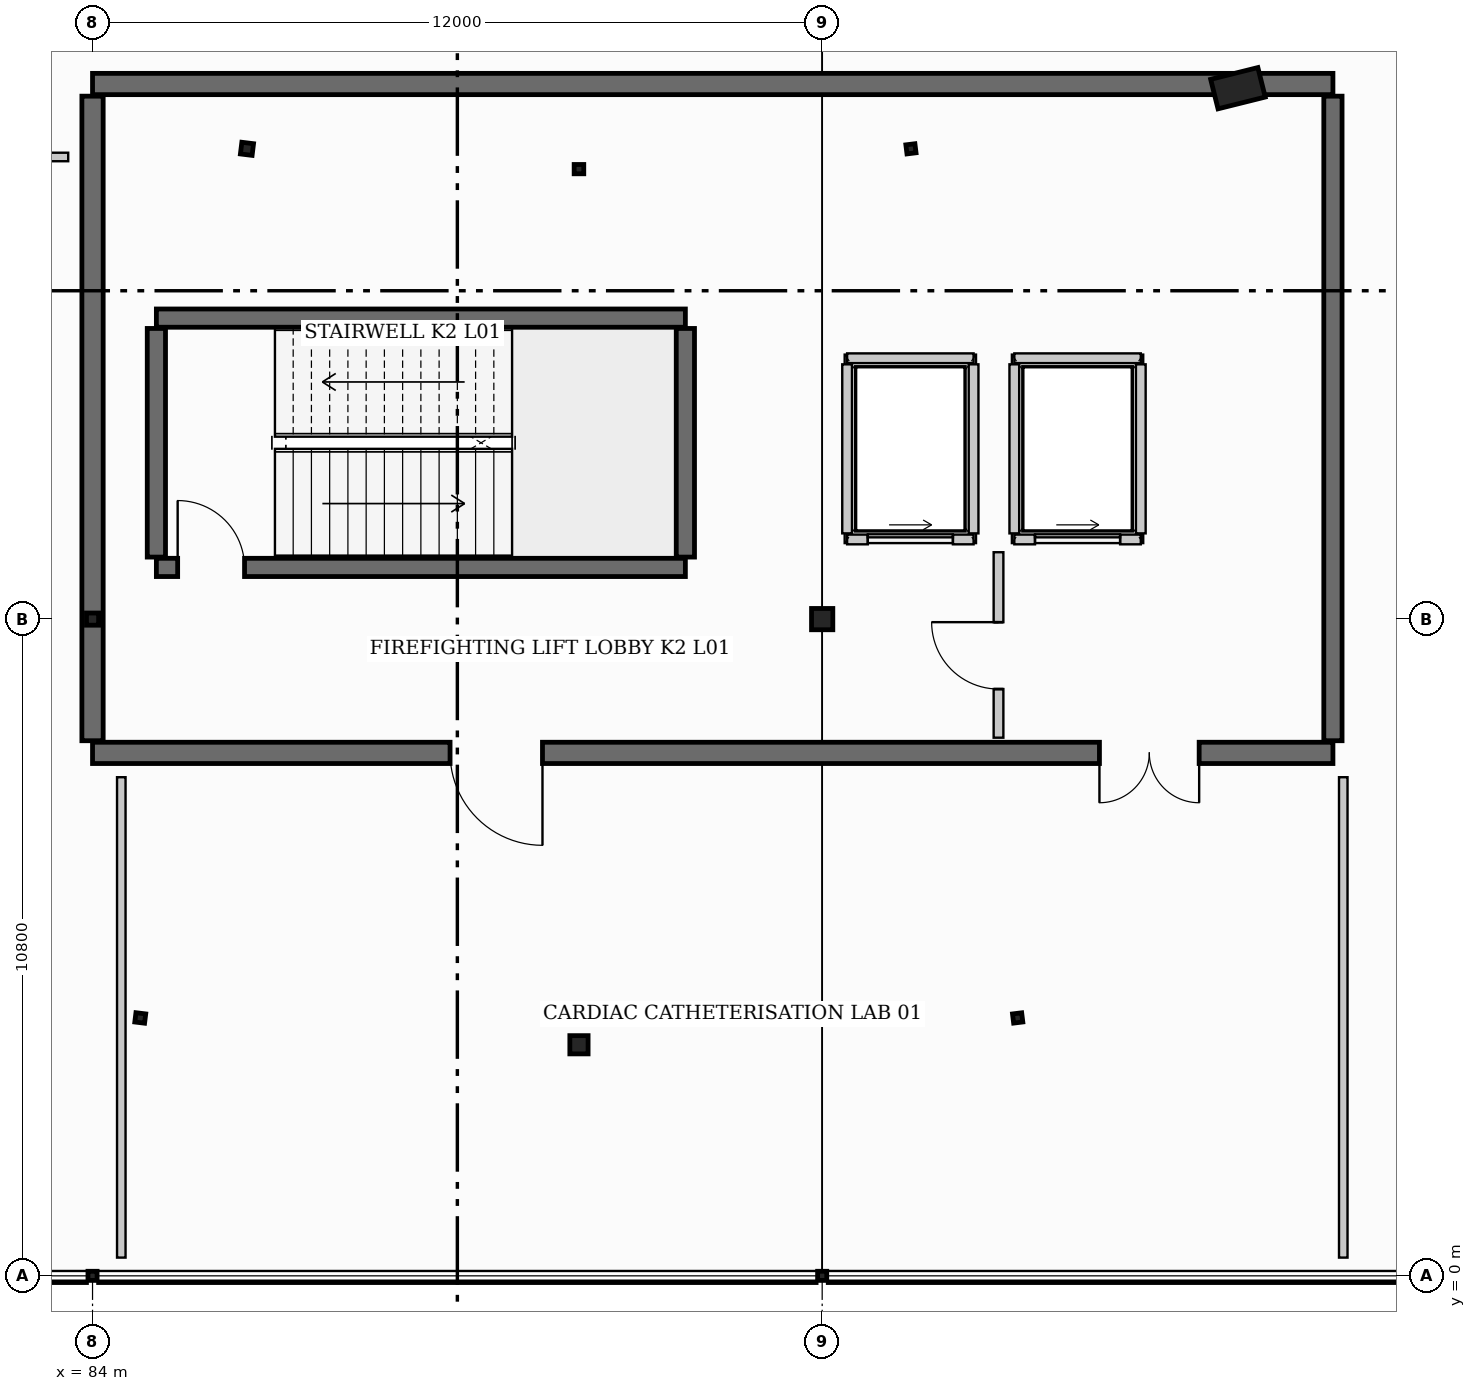
"""IFC4 building model, lengths in metres.
Left out: names, types, materials, properties, quantities, classifications, styles, units other than length and angle.
Written with IfcOpenShell. Run it as: python <this file> out.ifc"""

import sys

from ifc_helpers import new_model, si_unit, direction, frame, frame_2d, origin, origin_2d, place, context, subcontext, project, spatial, rectangle, hollow_rectangle, hollow_circle, i_section, extrude, element, fill, save


model = new_model("IFC4")
c1 = context("Model", 3, precision=1e-05, world=origin(), true_north=direction((0.0, 1.0)))
c2 = subcontext(c1, "Body", "Model", "MODEL_VIEW")
j1 = project(units=[si_unit("LENGTHUNIT", "METRE"), si_unit("PLANEANGLEUNIT", "RADIAN")], contexts=[c1])
p1 = place(None, origin())
s1 = spatial("IfcSite", under=j1, at=p1, CompositionType="ELEMENT")
p2 = place(p1, origin())
s2 = spatial("IfcBuilding", under=s1, at=p2, CompositionType="ELEMENT")
p3 = place(p2, frame((0.0, 0.0, 4.8)))
s3 = spatial("IfcBuildingStorey", under=s2, at=p3, CompositionType="ELEMENT", Elevation=4.8)
p4 = place(p3, frame((84.0, 0.0, 0.0), z_axis=(0.0, 0.0, 1.0), x_axis=(0.0, 1.0, 0.0)))
e1 = element("IfcColumn", 1, at=p4, inside=s3, PredefinedType="COLUMN", context=c2, shape_type="SweptSolid", body=[
    extrude(hollow_rectangle(XDim=0.15, YDim=0.15, WallThickness=0.008, at=origin_2d()), origin(), (0.0, 0.0, 1.0), 4.8),
])
p5 = place(p3, frame((84.0, 10.8, 0.0), z_axis=(0.0, 0.0, 1.0), x_axis=(0.0, 1.0, 0.0)))
e2 = element("IfcColumn", 2, at=p5, inside=s3, PredefinedType="COLUMN", context=c2, shape_type="SweptSolid", body=[
    extrude(hollow_rectangle(XDim=0.2, YDim=0.2, WallThickness=0.01, at=origin_2d()), origin(), (0.0, 0.0, 1.0), 4.8),
])
p6 = place(p3, frame((96.0, 0.0, 0.0), z_axis=(0.0, 0.0, 1.0), x_axis=(1.0, 0.0, 0.0)))
e3 = element("IfcColumn", 3, at=p6, inside=s3, PredefinedType="COLUMN", context=c2, shape_type="SweptSolid", body=[
    extrude(hollow_rectangle(XDim=0.15, YDim=0.15, WallThickness=0.008, at=origin_2d()), origin(), (0.0, 0.0, 1.0), 4.8),
])
p7 = place(p3, frame((96.0, 10.8, 0.0), z_axis=(0.0, 0.0, 1.0), x_axis=(1.0, 0.0, 0.0)))
e4 = element("IfcColumn", 4, at=p7, inside=s3, PredefinedType="COLUMN", context=c2, shape_type="SweptSolid", body=[
    extrude(i_section(OverallWidth=0.35, OverallDepth=0.35, WebThickness=0.014, FlangeThickness=0.024, at=origin_2d()), origin(), (0.0, 0.0, 1.0), 4.8),
])
p8 = place(p3, frame((84.785, 4.241, 0.0), z_axis=(0.0, 0.0, 1.0), x_axis=(0.121869343405, 0.992546151641, 0.0)))
e5 = element("IfcColumn", 5, at=p8, inside=s3, PredefinedType="COLUMN", context=c2, shape_type="SweptSolid", body=[
    extrude(i_section(OverallWidth=0.154, OverallDepth=0.162, WebThickness=0.008, FlangeThickness=0.011, at=origin_2d()), origin(), (0.0, 0.0, 1.0), 4.8),
])
p9 = place(p3, frame((86.54, 18.534, 0.0), z_axis=(0.0, 0.0, 1.0), x_axis=(0.121869343405, 0.992546151641, 0.0)))
e6 = element("IfcColumn", 6, at=p9, inside=s3, PredefinedType="COLUMN", context=c2, shape_type="SweptSolid", body=[
    extrude(hollow_circle(Radius=0.097, WallThickness=0.008, at=origin_2d()), origin(), (0.0, 0.0, 1.0), 4.8),
])
p10 = place(p3, frame((92.0, 3.8, 0.0), z_axis=(0.0, 0.0, 1.0), x_axis=(0.0, 1.0, 0.0)))
e7 = element("IfcColumn", 7, at=p10, inside=s3, PredefinedType="COLUMN", context=c2, shape_type="SweptSolid", body=[
    extrude(hollow_rectangle(XDim=0.3, YDim=0.3, WallThickness=0.012, at=origin_2d()), origin(), (0.0, 0.0, 1.0), 4.8),
])
p11 = place(p3, frame((92.0, 18.2, 0.0), z_axis=(0.0, 0.0, 1.0), x_axis=(0.0, 1.0, 0.0)))
e8 = element("IfcColumn", 8, at=p11, inside=s3, PredefinedType="COLUMN", context=c2, shape_type="SweptSolid", body=[
    extrude(i_section(OverallWidth=0.153, OverallDepth=0.158, WebThickness=0.007, FlangeThickness=0.01, at=origin_2d()), origin(), (0.0, 0.0, 1.0), 4.8),
])
p12 = place(p3, frame((99.215, 4.241, 0.0), z_axis=(0.0, 0.0, 1.0), x_axis=(-0.121869343405, 0.992546151641, 0.0)))
e9 = element("IfcColumn", 9, at=p12, inside=s3, PredefinedType="COLUMN", context=c2, shape_type="SweptSolid", body=[
    extrude(i_section(OverallWidth=0.152, OverallDepth=0.152, WebThickness=0.006, FlangeThickness=0.007, at=origin_2d()), origin(), (0.0, 0.0, 1.0), 4.8),
])
p13 = place(p3, frame((97.46, 18.534, 0.0), z_axis=(0.0, 0.0, 1.0), x_axis=(-0.121869343405, 0.992546151641, 0.0)))
e10 = element("IfcColumn", 10, at=p13, inside=s3, PredefinedType="COLUMN", context=c2, shape_type="SweptSolid", body=[
    extrude(hollow_rectangle(XDim=0.15, YDim=0.15, WallThickness=0.008, at=origin_2d()), origin(), (0.0, 0.0, 1.0), 4.8),
])
p14 = place(p3, frame((102.838, 19.531, 0.0), z_axis=(0.0, 0.0, 1.0), x_axis=(-0.2419218956, 0.970295726276, 0.0)))
e11 = element("IfcColumn", 11, at=p14, inside=s3, PredefinedType="PILASTER", context=c2, shape_type="SweptSolid", body=[
    extrude(rectangle(XDim=0.5, YDim=0.8, at=origin_2d()), origin(), (0.0, 0.0, 1.0), 4.8),
])
p15 = place(p3, frame((84.0, 19.6, 0.0), z_axis=(0.0, 0.0, 1.0), x_axis=(1.0, 0.0, 0.0)))
e12 = element("IfcWall", 12, at=p15, inside=s3, PredefinedType="SHEAR", context=c2, shape_type="SweptSolid", body=[
    extrude(rectangle(XDim=20.4, YDim=0.35, at=frame_2d((10.2, 0.0))), origin(), (0.0, 0.0, 1.0), 4.8),
])
p16 = place(p3, frame((104.4, 8.6, 0.0), z_axis=(0.0, 0.0, 1.0), x_axis=(-1.0, 0.0, 0.0)))
e13 = element("IfcWall", 13, at=p16, inside=s3, PredefinedType="SHEAR", context=c2, shape_type="SweptSolid", body=[
    extrude(rectangle(XDim=20.4, YDim=0.35, at=frame_2d((10.2, 0.0))), origin(), (0.0, 0.0, 1.0), 4.8),
])
p17 = place(p16, frame((2.2, 0.0, 0.0)))
e14 = element("IfcOpeningElement", 14, at=p17, cuts=e13, PredefinedType="OPENING", context=c2, shape_type="SweptSolid", body=[
    extrude(rectangle(XDim=1.64, YDim=2.2, at=frame_2d((0.82, 1.1))), frame((0.0, 0.185, 0.0), z_axis=(0.0, -1.0, 0.0), x_axis=(1.0, 0.0, 0.0)), (0.0, 0.0, 1.0), 0.37),
])
p18 = place(p16, frame((13.0, 0.0, 0.0)))
e15 = element("IfcOpeningElement", 15, at=p18, cuts=e13, PredefinedType="OPENING", context=c2, shape_type="SweptSolid", body=[
    extrude(rectangle(XDim=1.52, YDim=2.16, at=frame_2d((0.76, 1.08))), frame((0.0, 0.185, 0.0), z_axis=(0.0, -1.0, 0.0), x_axis=(1.0, 0.0, 0.0)), (0.0, 0.0, 1.0), 0.37),
])
p19 = place(p3, frame((84.0, 8.8, 0.0), z_axis=(0.0, 0.0, 1.0), x_axis=(0.0, 1.0, 0.0)))
e16 = element("IfcWall", 16, at=p19, inside=s3, PredefinedType="SHEAR", context=c2, shape_type="SweptSolid", body=[
    extrude(rectangle(XDim=10.6, YDim=0.35, at=frame_2d((5.3, 0.0))), origin(), (0.0, 0.0, 1.0), 4.8),
])
p20 = place(p3, frame((104.4, 19.4, 0.0), z_axis=(0.0, 0.0, 1.0), x_axis=(0.0, -1.0, 0.0)))
e17 = element("IfcWall", 17, at=p20, inside=s3, PredefinedType="SHEAR", context=c2, shape_type="SweptSolid", body=[
    extrude(rectangle(XDim=10.6, YDim=0.3, at=frame_2d((5.3, 0.0))), origin(), (0.0, 0.0, 1.0), 4.8),
])
p21 = place(p3, frame((85.05, 11.65, 0.0), z_axis=(0.0, 0.0, 1.0), x_axis=(1.0, 0.0, 0.0)))
e18 = element("IfcWall", 18, at=p21, inside=s3, PredefinedType="SHEAR", context=c2, shape_type="SweptSolid", body=[
    extrude(rectangle(XDim=8.7, YDim=0.3, at=frame_2d((4.35, 0.0))), origin(), (0.0, 0.0, 1.0), 4.8),
])
p22 = place(p21, frame((0.35, 0.0, 0.0)))
e19 = element("IfcOpeningElement", 19, at=p22, cuts=e18, PredefinedType="OPENING", context=c2, shape_type="SweptSolid", body=[
    extrude(rectangle(XDim=1.1, YDim=2.15, at=frame_2d((0.55, 1.075))), frame((0.0, 0.16, 0.0), z_axis=(0.0, -1.0, 0.0), x_axis=(1.0, 0.0, 0.0)), (0.0, 0.0, 1.0), 0.32),
])
p23 = place(p3, frame((93.75, 15.75, 0.0), z_axis=(0.0, 0.0, 1.0), x_axis=(-1.0, 0.0, 0.0)))
e20 = element("IfcWall", 20, at=p23, inside=s3, PredefinedType="SHEAR", context=c2, shape_type="SweptSolid", body=[
    extrude(rectangle(XDim=8.7, YDim=0.3, at=frame_2d((4.35, 0.0))), origin(), (0.0, 0.0, 1.0), 4.8),
])
for number, where, z_axis, x_axis in (
    (21, (85.05, 11.82, 0.0), (0.0, 0.0, 1.0), (0.0, 1.0, 0.0)),
    (22, (93.75, 11.82, 0.0), (0.0, 0.0, 1.0), (0.0, 1.0, 0.0)),
):
    element("IfcWall", number, at=place(p3, frame(where, z_axis=z_axis, x_axis=x_axis)), inside=s3, PredefinedType="SHEAR", context=c2, shape_type="SweptSolid", body=[
        extrude(rectangle(XDim=3.76, YDim=0.3, at=frame_2d((1.88, 0.0))), origin(), (0.0, 0.0, 1.0), 4.8),
    ])
p24 = place(p3, frame((96.41, 12.11, 0.0), z_axis=(0.0, 0.0, 1.0), x_axis=(1.0, 0.0, 0.0)))
e23 = element("IfcWall", 23, at=p24, inside=s3, PredefinedType="PARTITIONING", context=c2, shape_type="SweptSolid", body=[
    extrude(rectangle(XDim=2.08, YDim=0.16, at=frame_2d((1.04, 0.0))), origin(), (0.0, 0.0, 1.0), 4.43),
])
p25 = place(p24, frame((0.34, 0.0, 0.0)))
e24 = element("IfcOpeningElement", 24, at=p25, cuts=e23, PredefinedType="OPENING", context=c2, shape_type="SweptSolid", body=[
    extrude(rectangle(XDim=1.4, YDim=2.2, at=frame_2d((0.7, 1.1))), frame((0.0, 0.09, 0.0), z_axis=(0.0, -1.0, 0.0), x_axis=(1.0, 0.0, 0.0)), (0.0, 0.0, 1.0), 0.18),
])
p26 = place(p3, frame((98.49, 15.09, 0.0), z_axis=(0.0, 0.0, 1.0), x_axis=(-1.0, 0.0, 0.0)))
e25 = element("IfcWall", 25, at=p26, inside=s3, PredefinedType="PARTITIONING", context=c2, shape_type="SweptSolid", body=[
    extrude(rectangle(XDim=2.08, YDim=0.16, at=frame_2d((1.04, 0.0))), origin(), (0.0, 0.0, 1.0), 4.43),
])
for number, where, z_axis, x_axis in (
    (26, (96.41, 14.99, 0.0), (0.0, 0.0, 1.0), (0.0, -1.0, 0.0)),
    (27, (98.49, 12.21, 0.0), (0.0, 0.0, 1.0), (0.0, 1.0, 0.0)),
):
    element("IfcWall", number, at=place(p3, frame(where, z_axis=z_axis, x_axis=x_axis)), inside=s3, PredefinedType="PARTITIONING", context=c2, shape_type="SweptSolid", body=[
        extrude(rectangle(XDim=2.78, YDim=0.16, at=frame_2d((1.39, 0.0))), origin(), (0.0, 0.0, 1.0), 4.43),
    ])
p27 = place(p3, frame((99.16, 12.11, 0.0), z_axis=(0.0, 0.0, 1.0), x_axis=(1.0, 0.0, 0.0)))
e28 = element("IfcWall", 28, at=p27, inside=s3, PredefinedType="PARTITIONING", context=c2, shape_type="SweptSolid", body=[
    extrude(rectangle(XDim=2.08, YDim=0.16, at=frame_2d((1.04, 0.0))), origin(), (0.0, 0.0, 1.0), 4.43),
])
p28 = place(p27, frame((0.34, 0.0, 0.0)))
e29 = element("IfcOpeningElement", 29, at=p28, cuts=e28, PredefinedType="OPENING", context=c2, shape_type="SweptSolid", body=[
    extrude(rectangle(XDim=1.4, YDim=2.2, at=frame_2d((0.7, 1.1))), frame((0.0, 0.09, 0.0), z_axis=(0.0, -1.0, 0.0), x_axis=(1.0, 0.0, 0.0)), (0.0, 0.0, 1.0), 0.18),
])
p29 = place(p3, frame((101.24, 15.09, 0.0), z_axis=(0.0, 0.0, 1.0), x_axis=(-1.0, 0.0, 0.0)))
e30 = element("IfcWall", 30, at=p29, inside=s3, PredefinedType="PARTITIONING", context=c2, shape_type="SweptSolid", body=[
    extrude(rectangle(XDim=2.08, YDim=0.16, at=frame_2d((1.04, 0.0))), origin(), (0.0, 0.0, 1.0), 4.43),
])
for number, where, z_axis, x_axis in (
    (31, (99.16, 14.99, 0.0), (0.0, 0.0, 1.0), (0.0, -1.0, 0.0)),
    (32, (101.24, 12.21, 0.0), (0.0, 0.0, 1.0), (0.0, 1.0, 0.0)),
):
    element("IfcWall", number, at=place(p3, frame(where, z_axis=z_axis, x_axis=x_axis)), inside=s3, PredefinedType="PARTITIONING", context=c2, shape_type="SweptSolid", body=[
        extrude(rectangle(XDim=2.78, YDim=0.16, at=frame_2d((1.39, 0.0))), origin(), (0.0, 0.0, 1.0), 4.43),
    ])
p30 = place(p3, frame((98.9, 8.85, 0.0), z_axis=(0.0, 0.0, 1.0), x_axis=(0.0, 1.0, 0.0)))
e33 = element("IfcWall", 33, at=p30, inside=s3, PredefinedType="PARTITIONING", context=c2, shape_type="SweptSolid", body=[
    extrude(rectangle(XDim=3.05, YDim=0.16, at=frame_2d((1.525, 0.0))), origin(), (0.0, 0.0, 1.0), 3.976),
])
p31 = place(p30, frame((0.8, 0.0, 0.0)))
e34 = element("IfcOpeningElement", 34, at=p31, cuts=e33, PredefinedType="OPENING", context=c2, shape_type="SweptSolid", body=[
    extrude(rectangle(XDim=1.1, YDim=2.15, at=frame_2d((0.55, 1.075))), frame((0.0, 0.09, 0.0), z_axis=(0.0, -1.0, 0.0), x_axis=(1.0, 0.0, 0.0)), (0.0, 0.0, 1.0), 0.18),
])
p32 = place(p3, frame((71.25, 18.4, 0.0), z_axis=(0.0, 0.0, 1.0), x_axis=(1.0, 0.0, 0.0)))
e35 = element("IfcWall", 35, at=p32, inside=s3, PredefinedType="PARTITIONING", context=c2, shape_type="SweptSolid", body=[
    extrude(rectangle(XDim=12.35, YDim=0.14, at=frame_2d((6.175, 0.0))), origin(), (0.0, 0.0, 1.0), 4.43),
])
p33 = place(p32, frame((5.525, 0.0, 0.0)))
e36 = element("IfcOpeningElement", 36, at=p33, cuts=e35, PredefinedType="OPENING", context=c2, shape_type="SweptSolid", body=[
    extrude(rectangle(XDim=1.12, YDim=2.08, at=frame_2d((0.56, 1.04))), frame((0.0, 0.08, 0.0), z_axis=(0.0, -1.0, 0.0), x_axis=(1.0, 0.0, 0.0)), (0.0, 0.0, 1.0), 0.16),
])
p34 = place(p3, frame((84.473, 0.3, 0.0), z_axis=(0.0, 0.0, 1.0), x_axis=(0.0, 1.0, 0.0)))
e37 = element("IfcWall", 37, at=p34, inside=s3, PredefinedType="PARTITIONING", context=c2, shape_type="SweptSolid", body=[
    extrude(rectangle(XDim=7.9, YDim=0.14, at=frame_2d((3.95, 0.0))), origin(), (0.0, 0.0, 1.0), 4.174),
])
p35 = place(p3, frame((104.57, 0.3, 0.0), z_axis=(0.0, 0.0, 1.0), x_axis=(0.0, 1.0, 0.0)))
e38 = element("IfcWall", 38, at=p35, inside=s3, PredefinedType="PARTITIONING", context=c2, shape_type="SweptSolid", body=[
    extrude(rectangle(XDim=7.9, YDim=0.14, at=frame_2d((3.95, 0.0))), origin(), (0.0, 0.0, 1.0), 3.976),
])
p36 = place(p25, origin())
e39 = element("IfcDoor", 39, at=p36, inside=s3, OperationType="SLIDING_TO_LEFT", PredefinedType="DOOR", context=c2, shape_type="SweptSolid", body=[
    extrude(rectangle(XDim=1.4, YDim=2.2, at=frame_2d((0.7, 1.1))), frame((0.0, 0.025, 0.0), z_axis=(0.0, -1.0, 0.0), x_axis=(1.0, 0.0, 0.0)), (0.0, 0.0, 1.0), 0.05),
])
fill(e24, e39)
p37 = place(p28, origin())
e40 = element("IfcDoor", 40, at=p37, inside=s3, OperationType="SLIDING_TO_LEFT", PredefinedType="DOOR", context=c2, shape_type="SweptSolid", body=[
    extrude(rectangle(XDim=1.4, YDim=2.2, at=frame_2d((0.7, 1.1))), frame((0.0, 0.025, 0.0), z_axis=(0.0, -1.0, 0.0), x_axis=(1.0, 0.0, 0.0)), (0.0, 0.0, 1.0), 0.05),
])
fill(e29, e40)
p38 = place(p22, origin())
e41 = element("IfcDoor", 41, at=p38, inside=s3, OperationType="SINGLE_SWING_LEFT", PredefinedType="DOOR", context=c2, shape_type="SweptSolid", body=[
    extrude(rectangle(XDim=1.1, YDim=2.15, at=frame_2d((0.55, 1.075))), frame((0.0, 0.025, 0.0), z_axis=(0.0, -1.0, 0.0), x_axis=(1.0, 0.0, 0.0)), (0.0, 0.0, 1.0), 0.05),
])
fill(e19, e41)
p39 = place(p17, origin())
e42 = element("IfcDoor", 42, at=p39, inside=s3, OperationType="DOUBLE_DOOR_SINGLE_SWING", PredefinedType="DOOR", context=c2, shape_type="SweptSolid", body=[
    extrude(rectangle(XDim=1.64, YDim=2.2, at=frame_2d((0.82, 1.1))), frame((0.0, 0.025, 0.0), z_axis=(0.0, -1.0, 0.0), x_axis=(1.0, 0.0, 0.0)), (0.0, 0.0, 1.0), 0.05),
])
fill(e14, e42)
p40 = place(p18, origin())
e43 = element("IfcDoor", 43, at=p40, inside=s3, OperationType="SINGLE_SWING_LEFT", PredefinedType="DOOR", context=c2, shape_type="SweptSolid", body=[
    extrude(rectangle(XDim=1.52, YDim=2.16, at=frame_2d((0.76, 1.08))), frame((0.0, 0.025, 0.0), z_axis=(0.0, -1.0, 0.0), x_axis=(1.0, 0.0, 0.0)), (0.0, 0.0, 1.0), 0.05),
])
fill(e15, e43)
p41 = place(p31, origin())
e44 = element("IfcDoor", 44, at=p41, inside=s3, OperationType="SINGLE_SWING_RIGHT", PredefinedType="DOOR", context=c2, shape_type="SweptSolid", body=[
    extrude(rectangle(XDim=1.1, YDim=2.15, at=frame_2d((0.55, 1.075))), frame((0.0, 0.025, 0.0), z_axis=(0.0, -1.0, 0.0), x_axis=(1.0, 0.0, 0.0)), (0.0, 0.0, 1.0), 0.05),
])
fill(e34, e44)
save(model, sys.argv[1])
